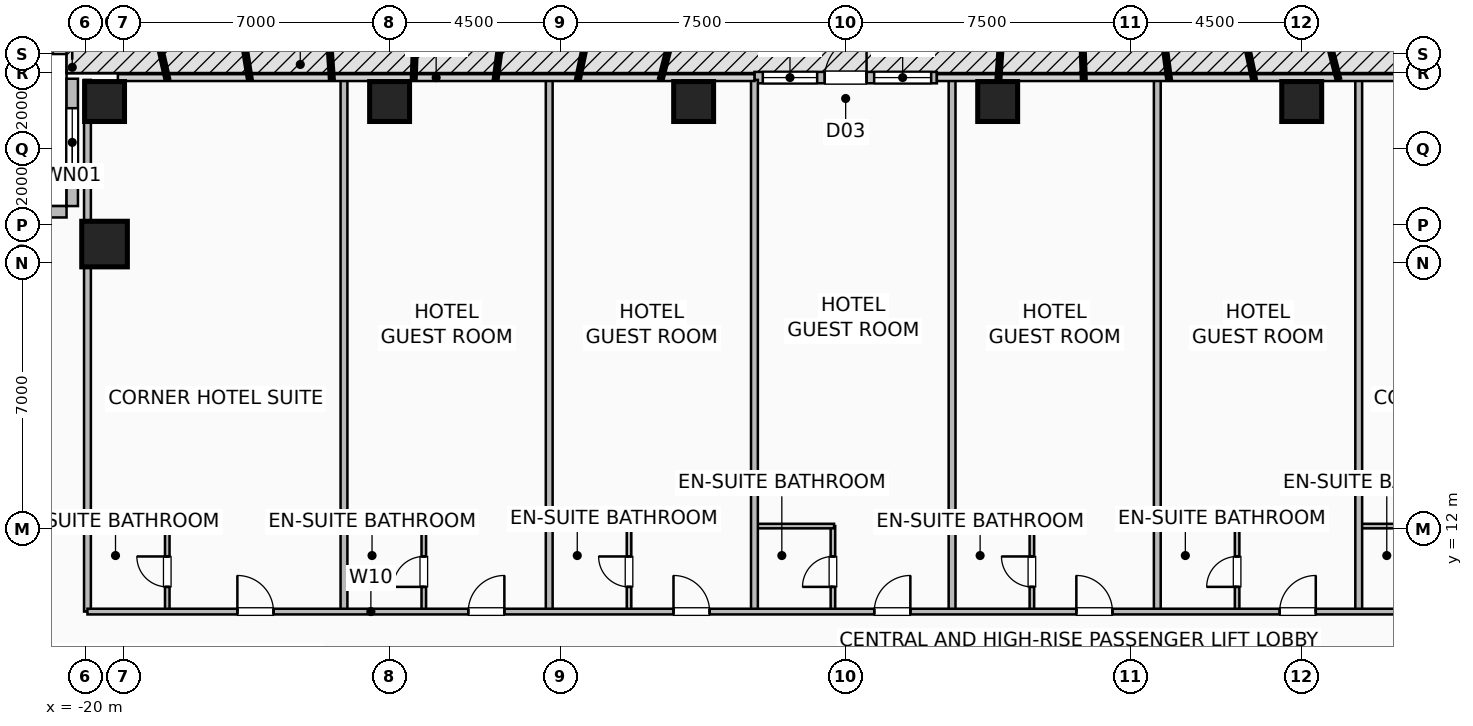
"""IFC4 building model, lengths in metres.
Left out: names, types, materials, properties, quantities, classifications, styles, units other than length and angle.
Written with IfcOpenShell. Run it as: python <this file> out.ifc"""

import sys

from ifc_helpers import new_model, si_unit, direction, frame, frame_2d, origin, origin_2d, place, context, subcontext, project, spatial, rectangle, hollow_rectangle, extrude, element, fill, save


model = new_model("IFC4")
c1 = context("Model", 3, precision=1e-05, world=origin(), true_north=direction((0.0, 1.0)))
c2 = subcontext(c1, "Body", "Model", "MODEL_VIEW")
j1 = project(units=[si_unit("LENGTHUNIT", "METRE"), si_unit("PLANEANGLEUNIT", "RADIAN")], contexts=[c1])
p1 = place(None, origin())
s1 = spatial("IfcSite", under=j1, at=p1, CompositionType="ELEMENT")
p2 = place(p1, origin())
s2 = spatial("IfcBuilding", under=s1, at=p2, CompositionType="ELEMENT")
p3 = place(p2, frame((0.0, 0.0, 27.0)))
s3 = spatial("IfcBuildingStorey", under=s2, at=p3, CompositionType="ELEMENT", Elevation=27.0)
p4 = place(p3, frame((-19.5, 23.25, 0.0), z_axis=(0.0, 0.0, 1.0), x_axis=(1.0, 0.0, 0.0)))
e1 = element("IfcColumn", 1, at=p4, inside=s3, PredefinedType="COLUMN", context=c2, shape_type="SweptSolid", body=[
    extrude(hollow_rectangle(XDim=1.05, YDim=1.05, WallThickness=0.05, at=origin_2d()), origin(), (0.0, 0.0, 1.0), 3.5),
])
p5 = place(p3, frame((-12.0, 23.25, -0.4), z_axis=(0.0, 0.0, 1.0), x_axis=(1.0, 0.0, 0.0)))
e2 = element("IfcColumn", 2, at=p5, inside=s3, PredefinedType="COLUMN", context=c2, shape_type="SweptSolid", body=[
    extrude(hollow_rectangle(XDim=1.05, YDim=1.05, WallThickness=0.05, at=origin_2d()), origin(), (0.0, 0.0, 1.0), 3.9),
])
for number, where, z_axis, x_axis in (
    (3, (-4.0, 23.25, 0.0), (0.0, 0.0, 1.0), (1.0, 0.0, 0.0)),
    (4, (4.0, 23.25, 0.0), (0.0, 0.0, 1.0), (1.0, 0.0, 0.0)),
):
    element("IfcColumn", number, at=place(p3, frame(where, z_axis=z_axis, x_axis=x_axis)), inside=s3, PredefinedType="COLUMN", context=c2, shape_type="SweptSolid", body=[
        extrude(hollow_rectangle(XDim=1.05, YDim=1.05, WallThickness=0.05, at=origin_2d()), origin(), (0.0, 0.0, 1.0), 3.5),
    ])
p6 = place(p3, frame((12.0, 23.25, -0.4), z_axis=(0.0, 0.0, 1.0), x_axis=(1.0, 0.0, 0.0)))
e5 = element("IfcColumn", 5, at=p6, inside=s3, PredefinedType="COLUMN", context=c2, shape_type="SweptSolid", body=[
    extrude(hollow_rectangle(XDim=1.05, YDim=1.05, WallThickness=0.05, at=origin_2d()), origin(), (0.0, 0.0, 1.0), 3.9),
])
p7 = place(p3, frame((-19.5, 19.5, 0.0), z_axis=(0.0, 0.0, 1.0), x_axis=(1.0, 0.0, 0.0)))
e6 = element("IfcColumn", 6, at=p7, inside=s3, PredefinedType="COLUMN", context=c2, shape_type="SweptSolid", body=[
    extrude(hollow_rectangle(XDim=1.2, YDim=1.2, WallThickness=0.055, at=origin_2d()), origin(), (0.0, 0.0, 1.0), 3.5),
])
p8 = place(p3, frame((-2.4, 23.88, 0.0), z_axis=(0.0, 0.0, 1.0), x_axis=(1.0, 0.0, 0.0)))
e7 = element("IfcWall", 7, at=p8, inside=s3, PredefinedType="SOLIDWALL", context=c2, shape_type="SweptSolid", body=[
    extrude(rectangle(XDim=4.8, YDim=0.3, at=frame_2d((2.4, 0.0))), origin(), (0.0, 0.0, 1.0), 3.25),
])
p9 = place(p8, frame((1.85, 0.0, 0.0)))
e8 = element("IfcOpeningElement", 8, at=p9, cuts=e7, PredefinedType="OPENING", context=c2, shape_type="SweptSolid", body=[
    extrude(rectangle(XDim=1.1, YDim=2.2, at=frame_2d((0.55, 1.1))), frame((0.0, 0.16, 0.0), z_axis=(0.0, -1.0, 0.0), x_axis=(1.0, 0.0, 0.0)), (0.0, 0.0, 1.0), 0.32),
])
p10 = place(p8, frame((0.22, 0.0, 0.85)))
e9 = element("IfcOpeningElement", 9, at=p10, cuts=e7, PredefinedType="OPENING", context=c2, shape_type="SweptSolid", body=[
    extrude(rectangle(XDim=1.43, YDim=1.8, at=frame_2d((0.715, 0.9))), frame((0.0, 0.16, 0.0), z_axis=(0.0, -1.0, 0.0), x_axis=(1.0, 0.0, 0.0)), (0.0, 0.0, 1.0), 0.32),
])
p11 = place(p8, frame((3.15, 0.0, 0.85)))
e10 = element("IfcOpeningElement", 10, at=p11, cuts=e7, PredefinedType="OPENING", context=c2, shape_type="SweptSolid", body=[
    extrude(rectangle(XDim=1.5, YDim=1.8, at=frame_2d((0.75, 0.9))), frame((0.0, 0.16, 0.0), z_axis=(0.0, -1.0, 0.0), x_axis=(1.0, 0.0, 0.0)), (0.0, 0.0, 1.0), 0.32),
])
p12 = place(p3, frame((-20.35, 23.85, 0.0), z_axis=(0.0, 0.0, 1.0), x_axis=(0.0, -1.0, 0.0)))
e11 = element("IfcWall", 11, at=p12, inside=s3, PredefinedType="SOLIDWALL", context=c2, shape_type="SweptSolid", body=[
    extrude(rectangle(XDim=3.35, YDim=0.3, at=frame_2d((1.675, 0.0))), origin(), (0.0, 0.0, 1.0), 3.25),
])
p13 = place(p12, frame((0.775, 0.0, 0.9)))
e12 = element("IfcOpeningElement", 12, at=p13, cuts=e11, PredefinedType="OPENING", context=c2, shape_type="SweptSolid", body=[
    extrude(rectangle(XDim=1.8, YDim=1.8, at=frame_2d((0.9, 0.9))), frame((0.0, 0.16, 0.0), z_axis=(0.0, -1.0, 0.0), x_axis=(1.0, 0.0, 0.0)), (0.0, 0.0, 1.0), 0.32),
])
p14 = place(p3, frame((-23.85, 20.35, 0.0), z_axis=(0.0, 0.0, 1.0), x_axis=(1.0, 0.0, 0.0)))
e13 = element("IfcWall", 13, at=p14, inside=s3, PredefinedType="SOLIDWALL", context=c2, shape_type="SweptSolid", body=[
    extrude(rectangle(XDim=3.35, YDim=0.3, at=frame_2d((1.675, 0.0))), origin(), (0.0, 0.0, 1.0), 3.25),
])
p15 = place(p3, frame((-17.85, 9.83, 0.0), z_axis=(0.0, 0.0, 1.0), x_axis=(0.0, 1.0, 0.0)))
e14 = element("IfcWall", 14, at=p15, inside=s3, PredefinedType="PLUMBINGWALL", context=c2, shape_type="SweptSolid", body=[
    extrude(rectangle(XDim=2.25, YDim=0.12, at=frame_2d((1.125, 0.0))), origin(), (0.0, 0.0, 1.0), 3.25),
])
p16 = place(p15, frame((0.65, 0.0, 0.0)))
e15 = element("IfcOpeningElement", 15, at=p16, cuts=e14, PredefinedType="OPENING", context=c2, shape_type="SweptSolid", body=[
    extrude(rectangle(XDim=0.8, YDim=2.05, at=frame_2d((0.4, 1.025))), frame((0.0, 0.07, 0.0), z_axis=(0.0, -1.0, 0.0), x_axis=(1.0, 0.0, 0.0)), (0.0, 0.0, 1.0), 0.14),
])
p17 = place(p3, frame((-19.92, 12.08, 0.0), z_axis=(0.0, 0.0, 1.0), x_axis=(1.0, 0.0, 0.0)))
e16 = element("IfcWall", 16, at=p17, inside=s3, PredefinedType="PLUMBINGWALL", context=c2, shape_type="SweptSolid", body=[
    extrude(rectangle(XDim=2.1, YDim=0.12, at=frame_2d((1.05, 0.0))), origin(), (0.0, 0.0, 1.0), 3.25),
])
p18 = place(p3, frame((-11.1, 9.83, 0.0), z_axis=(0.0, 0.0, 1.0), x_axis=(0.0, 1.0, 0.0)))
e17 = element("IfcWall", 17, at=p18, inside=s3, PredefinedType="PLUMBINGWALL", context=c2, shape_type="SweptSolid", body=[
    extrude(rectangle(XDim=2.25, YDim=0.12, at=frame_2d((1.125, 0.0))), origin(), (0.0, 0.0, 1.0), 3.25),
])
p19 = place(p18, frame((0.65, 0.0, 0.0)))
e18 = element("IfcOpeningElement", 18, at=p19, cuts=e17, PredefinedType="OPENING", context=c2, shape_type="SweptSolid", body=[
    extrude(rectangle(XDim=0.8, YDim=2.05, at=frame_2d((0.4, 1.025))), frame((0.0, 0.07, 0.0), z_axis=(0.0, -1.0, 0.0), x_axis=(1.0, 0.0, 0.0)), (0.0, 0.0, 1.0), 0.14),
])
p20 = place(p3, frame((-13.17, 12.08, 0.0), z_axis=(0.0, 0.0, 1.0), x_axis=(1.0, 0.0, 0.0)))
e19 = element("IfcWall", 19, at=p20, inside=s3, PredefinedType="PLUMBINGWALL", context=c2, shape_type="SweptSolid", body=[
    extrude(rectangle(XDim=2.1, YDim=0.12, at=frame_2d((1.05, 0.0))), origin(), (0.0, 0.0, 1.0), 3.25),
])
p21 = place(p3, frame((-5.7, 9.83, 0.0), z_axis=(0.0, 0.0, 1.0), x_axis=(0.0, 1.0, 0.0)))
e20 = element("IfcWall", 20, at=p21, inside=s3, PredefinedType="PLUMBINGWALL", context=c2, shape_type="SweptSolid", body=[
    extrude(rectangle(XDim=2.25, YDim=0.12, at=frame_2d((1.125, 0.0))), origin(), (0.0, 0.0, 1.0), 3.25),
])
p22 = place(p21, frame((0.65, 0.0, 0.0)))
e21 = element("IfcOpeningElement", 21, at=p22, cuts=e20, PredefinedType="OPENING", context=c2, shape_type="SweptSolid", body=[
    extrude(rectangle(XDim=0.8, YDim=2.05, at=frame_2d((0.4, 1.025))), frame((0.0, 0.07, 0.0), z_axis=(0.0, -1.0, 0.0), x_axis=(1.0, 0.0, 0.0)), (0.0, 0.0, 1.0), 0.14),
])
p23 = place(p3, frame((-7.77, 12.08, 0.0), z_axis=(0.0, 0.0, 1.0), x_axis=(1.0, 0.0, 0.0)))
e22 = element("IfcWall", 22, at=p23, inside=s3, PredefinedType="PLUMBINGWALL", context=c2, shape_type="SweptSolid", body=[
    extrude(rectangle(XDim=2.1, YDim=0.12, at=frame_2d((1.05, 0.0))), origin(), (0.0, 0.0, 1.0), 3.25),
])
p24 = place(p3, frame((-0.335, 9.83, 0.0), z_axis=(0.0, 0.0, 1.0), x_axis=(0.0, 1.0, 0.0)))
e23 = element("IfcWall", 23, at=p24, inside=s3, PredefinedType="PLUMBINGWALL", context=c2, shape_type="SweptSolid", body=[
    extrude(rectangle(XDim=2.25, YDim=0.12, at=frame_2d((1.125, 0.0))), origin(), (0.0, 0.0, 1.0), 3.25),
])
p25 = place(p24, frame((0.65, 0.0, 0.0)))
e24 = element("IfcOpeningElement", 24, at=p25, cuts=e23, PredefinedType="OPENING", context=c2, shape_type="SweptSolid", body=[
    extrude(rectangle(XDim=0.8, YDim=2.05, at=frame_2d((0.4, 1.025))), frame((0.0, 0.07, 0.0), z_axis=(0.0, -1.0, 0.0), x_axis=(1.0, 0.0, 0.0)), (0.0, 0.0, 1.0), 0.14),
])
p26 = place(p3, frame((-2.37, 12.08, 0.0), z_axis=(0.0, 0.0, 1.0), x_axis=(1.0, 0.0, 0.0)))
e25 = element("IfcWall", 25, at=p26, inside=s3, PredefinedType="PLUMBINGWALL", context=c2, shape_type="SweptSolid", body=[
    extrude(rectangle(XDim=2.065, YDim=0.12, at=frame_2d((1.033, 0.0))), origin(), (0.0, 0.0, 1.0), 3.25),
])
p27 = place(p3, frame((4.9, 9.83, 0.0), z_axis=(0.0, 0.0, 1.0), x_axis=(0.0, 1.0, 0.0)))
e26 = element("IfcWall", 26, at=p27, inside=s3, PredefinedType="PLUMBINGWALL", context=c2, shape_type="SweptSolid", body=[
    extrude(rectangle(XDim=2.25, YDim=0.12, at=frame_2d((1.125, 0.0))), origin(), (0.0, 0.0, 1.0), 2.818),
])
p28 = place(p27, frame((0.65, 0.0, 0.0)))
e27 = element("IfcOpeningElement", 27, at=p28, cuts=e26, PredefinedType="OPENING", context=c2, shape_type="SweptSolid", body=[
    extrude(rectangle(XDim=0.8, YDim=2.05, at=frame_2d((0.4, 1.025))), frame((0.0, 0.07, 0.0), z_axis=(0.0, -1.0, 0.0), x_axis=(1.0, 0.0, 0.0)), (0.0, 0.0, 1.0), 0.14),
])
p29 = place(p3, frame((2.83, 12.08, 0.0), z_axis=(0.0, 0.0, 1.0), x_axis=(1.0, 0.0, 0.0)))
e28 = element("IfcWall", 28, at=p29, inside=s3, PredefinedType="PLUMBINGWALL", context=c2, shape_type="SweptSolid", body=[
    extrude(rectangle(XDim=2.1, YDim=0.12, at=frame_2d((1.05, 0.0))), origin(), (0.0, 0.0, 1.0), 3.25),
])
p30 = place(p3, frame((10.3, 9.83, 0.0), z_axis=(0.0, 0.0, 1.0), x_axis=(0.0, 1.0, 0.0)))
e29 = element("IfcWall", 29, at=p30, inside=s3, PredefinedType="PLUMBINGWALL", context=c2, shape_type="SweptSolid", body=[
    extrude(rectangle(XDim=2.25, YDim=0.12, at=frame_2d((1.125, 0.0))), origin(), (0.0, 0.0, 1.0), 3.25),
])
p31 = place(p30, frame((0.65, 0.0, 0.0)))
e30 = element("IfcOpeningElement", 30, at=p31, cuts=e29, PredefinedType="OPENING", context=c2, shape_type="SweptSolid", body=[
    extrude(rectangle(XDim=0.8, YDim=2.05, at=frame_2d((0.4, 1.025))), frame((0.0, 0.07, 0.0), z_axis=(0.0, -1.0, 0.0), x_axis=(1.0, 0.0, 0.0)), (0.0, 0.0, 1.0), 0.14),
])
p32 = place(p3, frame((8.23, 12.08, 0.0), z_axis=(0.0, 0.0, 1.0), x_axis=(1.0, 0.0, 0.0)))
e31 = element("IfcWall", 31, at=p32, inside=s3, PredefinedType="PLUMBINGWALL", context=c2, shape_type="SweptSolid", body=[
    extrude(rectangle(XDim=2.1, YDim=0.12, at=frame_2d((1.05, 0.0))), origin(), (0.0, 0.0, 1.0), 3.25),
])
p33 = place(p3, frame((13.53, 12.08, 0.0), z_axis=(0.0, 0.0, 1.0), x_axis=(1.0, 0.0, 0.0)))
e32 = element("IfcWall", 32, at=p33, inside=s3, PredefinedType="PLUMBINGWALL", context=c2, shape_type="SweptSolid", body=[
    extrude(rectangle(XDim=2.1, YDim=0.12, at=frame_2d((1.05, 0.0))), origin(), (0.0, 0.0, 1.0), 3.25),
])
for number, where, z_axis, x_axis in (
    (33, (-19.95, 9.83, 0.0), (0.0, 0.0, 1.0), (0.0, 1.0, 0.0)),
    (34, (-13.2, 9.83, 0.0), (0.0, 0.0, 1.0), (0.0, 1.0, 0.0)),
    (35, (-7.8, 9.83, 0.0), (0.0, 0.0, 1.0), (0.0, 1.0, 0.0)),
    (36, (-2.4, 9.83, 0.0), (0.0, 0.0, 1.0), (0.0, 1.0, 0.0)),
    (37, (2.8, 9.83, 0.0), (0.0, 0.0, 1.0), (0.0, 1.0, 0.0)),
    (38, (8.2, 9.83, 0.0), (0.0, 0.0, 1.0), (0.0, 1.0, 0.0)),
    (39, (13.5, 9.83, 0.0), (0.0, 0.0, 1.0), (0.0, 1.0, 0.0)),
):
    element("IfcWall", number, at=place(p3, frame(where, z_axis=z_axis, x_axis=x_axis)), inside=s3, PredefinedType="PARTITIONING", context=c2, shape_type="SweptSolid", body=[
        extrude(rectangle(XDim=13.99, YDim=0.18, at=frame_2d((6.995, 0.0))), origin(), (0.0, 0.0, 1.0), 3.25),
    ])
p34 = place(p3, frame((-19.95, 9.83, 0.0), z_axis=(0.0, 0.0, 1.0), x_axis=(1.0, 0.0, 0.0)))
e40 = element("IfcWall", 40, at=p34, inside=s3, PredefinedType="PARTITIONING", context=c2, shape_type="SweptSolid", body=[
    extrude(rectangle(XDim=39.9, YDim=0.15, at=frame_2d((19.95, 0.0))), origin(), (0.0, 0.0, 1.0), 3.25),
])
p35 = place(p34, frame((3.945, 0.0, 0.0)))
e41 = element("IfcOpeningElement", 41, at=p35, cuts=e40, PredefinedType="OPENING", context=c2, shape_type="SweptSolid", body=[
    extrude(rectangle(XDim=0.95, YDim=2.08, at=frame_2d((0.475, 1.04))), frame((0.0, 0.085, 0.0), z_axis=(0.0, -1.0, 0.0), x_axis=(1.0, 0.0, 0.0)), (0.0, 0.0, 1.0), 0.17),
])
p36 = place(p34, frame((10.02, 0.0, 0.0)))
e42 = element("IfcOpeningElement", 42, at=p36, cuts=e40, PredefinedType="OPENING", context=c2, shape_type="SweptSolid", body=[
    extrude(rectangle(XDim=0.95, YDim=2.08, at=frame_2d((0.475, 1.04))), frame((0.0, 0.085, 0.0), z_axis=(0.0, -1.0, 0.0), x_axis=(1.0, 0.0, 0.0)), (0.0, 0.0, 1.0), 0.17),
])
p37 = place(p34, frame((15.42, 0.0, 0.0)))
e43 = element("IfcOpeningElement", 43, at=p37, cuts=e40, PredefinedType="OPENING", context=c2, shape_type="SweptSolid", body=[
    extrude(rectangle(XDim=0.95, YDim=2.08, at=frame_2d((0.475, 1.04))), frame((0.0, 0.085, 0.0), z_axis=(0.0, -1.0, 0.0), x_axis=(1.0, 0.0, 0.0)), (0.0, 0.0, 1.0), 0.17),
])
p38 = place(p34, frame((20.702, 0.0, 0.0)))
e44 = element("IfcOpeningElement", 44, at=p38, cuts=e40, PredefinedType="OPENING", context=c2, shape_type="SweptSolid", body=[
    extrude(rectangle(XDim=0.95, YDim=2.08, at=frame_2d((0.475, 1.04))), frame((0.0, 0.085, 0.0), z_axis=(0.0, -1.0, 0.0), x_axis=(1.0, 0.0, 0.0)), (0.0, 0.0, 1.0), 0.17),
])
p39 = place(p34, frame((26.02, 0.0, 0.0)))
e45 = element("IfcOpeningElement", 45, at=p39, cuts=e40, PredefinedType="OPENING", context=c2, shape_type="SweptSolid", body=[
    extrude(rectangle(XDim=0.95, YDim=2.08, at=frame_2d((0.475, 1.04))), frame((0.0, 0.085, 0.0), z_axis=(0.0, -1.0, 0.0), x_axis=(1.0, 0.0, 0.0)), (0.0, 0.0, 1.0), 0.17),
])
p40 = place(p34, frame((31.37, 0.0, 0.0)))
e46 = element("IfcOpeningElement", 46, at=p40, cuts=e40, PredefinedType="OPENING", context=c2, shape_type="SweptSolid", body=[
    extrude(rectangle(XDim=0.95, YDim=2.08, at=frame_2d((0.475, 1.04))), frame((0.0, 0.085, 0.0), z_axis=(0.0, -1.0, 0.0), x_axis=(1.0, 0.0, 0.0)), (0.0, 0.0, 1.0), 0.17),
])
p41 = place(p34, frame((37.245, 0.0, 0.0)))
e47 = element("IfcOpeningElement", 47, at=p41, cuts=e40, PredefinedType="OPENING", context=c2, shape_type="SweptSolid", body=[
    extrude(rectangle(XDim=0.95, YDim=2.08, at=frame_2d((0.475, 1.04))), frame((0.0, 0.085, 0.0), z_axis=(0.0, -1.0, 0.0), x_axis=(1.0, 0.0, 0.0)), (0.0, 0.0, 1.0), 0.17),
])
p42 = place(p9, origin())
e48 = element("IfcDoor", 48, at=p42, inside=s3, OperationType="SINGLE_SWING_RIGHT", PredefinedType="DOOR", context=c2, shape_type="SweptSolid", body=[
    extrude(rectangle(XDim=1.1, YDim=2.2, at=frame_2d((0.55, 1.1))), frame((0.0, 0.025, 0.0), z_axis=(0.0, -1.0, 0.0), x_axis=(1.0, 0.0, 0.0)), (0.0, 0.0, 1.0), 0.05),
])
fill(e8, e48)
p43 = place(p10, origin())
e49 = element("IfcWindow", 49, at=p43, inside=s3, PartitioningType="SINGLE_PANEL", PredefinedType="WINDOW", context=c2, shape_type="SweptSolid", body=[
    extrude(rectangle(XDim=1.43, YDim=1.8, at=frame_2d((0.715, 0.9))), frame((0.0, 0.03, 0.0), z_axis=(0.0, -1.0, 0.0), x_axis=(1.0, 0.0, 0.0)), (0.0, 0.0, 1.0), 0.06),
])
fill(e9, e49)
p44 = place(p11, origin())
e50 = element("IfcWindow", 50, at=p44, inside=s3, PartitioningType="SINGLE_PANEL", PredefinedType="WINDOW", context=c2, shape_type="SweptSolid", body=[
    extrude(rectangle(XDim=1.5, YDim=1.8, at=frame_2d((0.75, 0.9))), frame((0.0, 0.03, 0.0), z_axis=(0.0, -1.0, 0.0), x_axis=(1.0, 0.0, 0.0)), (0.0, 0.0, 1.0), 0.06),
])
fill(e10, e50)
p45 = place(p13, origin())
e51 = element("IfcWindow", 51, at=p45, inside=s3, PartitioningType="SINGLE_PANEL", PredefinedType="WINDOW", context=c2, shape_type="SweptSolid", body=[
    extrude(rectangle(XDim=1.8, YDim=1.8, at=frame_2d((0.9, 0.9))), frame((0.0, 0.03, 0.0), z_axis=(0.0, -1.0, 0.0), x_axis=(1.0, 0.0, 0.0)), (0.0, 0.0, 1.0), 0.06),
])
fill(e12, e51)
p46 = place(p16, origin())
e52 = element("IfcDoor", 52, at=p46, inside=s3, OperationType="SINGLE_SWING_RIGHT", PredefinedType="DOOR", context=c2, shape_type="SweptSolid", body=[
    extrude(rectangle(XDim=0.8, YDim=2.05, at=frame_2d((0.4, 1.025))), frame((0.0, 0.025, 0.0), z_axis=(0.0, -1.0, 0.0), x_axis=(1.0, 0.0, 0.0)), (0.0, 0.0, 1.0), 0.05),
])
fill(e15, e52)
p47 = place(p19, origin())
e53 = element("IfcDoor", 53, at=p47, inside=s3, OperationType="SINGLE_SWING_LEFT", PredefinedType="DOOR", context=c2, shape_type="SweptSolid", body=[
    extrude(rectangle(XDim=0.8, YDim=2.05, at=frame_2d((0.4, 1.025))), frame((0.0, 0.025, 0.0), z_axis=(0.0, -1.0, 0.0), x_axis=(1.0, 0.0, 0.0)), (0.0, 0.0, 1.0), 0.05),
])
fill(e18, e53)
p48 = place(p22, origin())
e54 = element("IfcDoor", 54, at=p48, inside=s3, OperationType="SINGLE_SWING_RIGHT", PredefinedType="DOOR", context=c2, shape_type="SweptSolid", body=[
    extrude(rectangle(XDim=0.8, YDim=2.05, at=frame_2d((0.4, 1.025))), frame((0.0, 0.025, 0.0), z_axis=(0.0, -1.0, 0.0), x_axis=(1.0, 0.0, 0.0)), (0.0, 0.0, 1.0), 0.05),
])
fill(e21, e54)
p49 = place(p25, origin())
e55 = element("IfcDoor", 55, at=p49, inside=s3, OperationType="SINGLE_SWING_LEFT", PredefinedType="DOOR", context=c2, shape_type="SweptSolid", body=[
    extrude(rectangle(XDim=0.8, YDim=2.05, at=frame_2d((0.4, 1.025))), frame((0.0, 0.025, 0.0), z_axis=(0.0, -1.0, 0.0), x_axis=(1.0, 0.0, 0.0)), (0.0, 0.0, 1.0), 0.05),
])
fill(e24, e55)
p50 = place(p28, origin())
e56 = element("IfcDoor", 56, at=p50, inside=s3, OperationType="SINGLE_SWING_RIGHT", PredefinedType="DOOR", context=c2, shape_type="SweptSolid", body=[
    extrude(rectangle(XDim=0.8, YDim=2.05, at=frame_2d((0.4, 1.025))), frame((0.0, 0.025, 0.0), z_axis=(0.0, -1.0, 0.0), x_axis=(1.0, 0.0, 0.0)), (0.0, 0.0, 1.0), 0.05),
])
fill(e27, e56)
p51 = place(p31, origin())
e57 = element("IfcDoor", 57, at=p51, inside=s3, OperationType="SINGLE_SWING_LEFT", PredefinedType="DOOR", context=c2, shape_type="SweptSolid", body=[
    extrude(rectangle(XDim=0.8, YDim=2.05, at=frame_2d((0.4, 1.025))), frame((0.0, 0.025, 0.0), z_axis=(0.0, -1.0, 0.0), x_axis=(1.0, 0.0, 0.0)), (0.0, 0.0, 1.0), 0.05),
])
fill(e30, e57)
p52 = place(p35, origin())
e58 = element("IfcDoor", 58, at=p52, inside=s3, OperationType="SINGLE_SWING_LEFT", PredefinedType="DOOR", context=c2, shape_type="SweptSolid", body=[
    extrude(rectangle(XDim=0.95, YDim=2.08, at=frame_2d((0.475, 1.04))), frame((0.0, 0.025, 0.0), z_axis=(0.0, -1.0, 0.0), x_axis=(1.0, 0.0, 0.0)), (0.0, 0.0, 1.0), 0.05),
])
fill(e41, e58)
p53 = place(p36, origin())
e59 = element("IfcDoor", 59, at=p53, inside=s3, OperationType="SINGLE_SWING_RIGHT", PredefinedType="DOOR", context=c2, shape_type="SweptSolid", body=[
    extrude(rectangle(XDim=0.95, YDim=2.08, at=frame_2d((0.475, 1.04))), frame((0.0, 0.025, 0.0), z_axis=(0.0, -1.0, 0.0), x_axis=(1.0, 0.0, 0.0)), (0.0, 0.0, 1.0), 0.05),
])
fill(e42, e59)
p54 = place(p37, origin())
e60 = element("IfcDoor", 60, at=p54, inside=s3, OperationType="SINGLE_SWING_LEFT", PredefinedType="DOOR", context=c2, shape_type="SweptSolid", body=[
    extrude(rectangle(XDim=0.95, YDim=2.08, at=frame_2d((0.475, 1.04))), frame((0.0, 0.025, 0.0), z_axis=(0.0, -1.0, 0.0), x_axis=(1.0, 0.0, 0.0)), (0.0, 0.0, 1.0), 0.05),
])
fill(e43, e60)
p55 = place(p38, origin())
e61 = element("IfcDoor", 61, at=p55, inside=s3, OperationType="SINGLE_SWING_RIGHT", PredefinedType="DOOR", context=c2, shape_type="SweptSolid", body=[
    extrude(rectangle(XDim=0.95, YDim=2.08, at=frame_2d((0.475, 1.04))), frame((0.0, 0.025, 0.0), z_axis=(0.0, -1.0, 0.0), x_axis=(1.0, 0.0, 0.0)), (0.0, 0.0, 1.0), 0.05),
])
fill(e44, e61)
p56 = place(p39, origin())
e62 = element("IfcDoor", 62, at=p56, inside=s3, OperationType="SINGLE_SWING_LEFT", PredefinedType="DOOR", context=c2, shape_type="SweptSolid", body=[
    extrude(rectangle(XDim=0.95, YDim=2.08, at=frame_2d((0.475, 1.04))), frame((0.0, 0.025, 0.0), z_axis=(0.0, -1.0, 0.0), x_axis=(1.0, 0.0, 0.0)), (0.0, 0.0, 1.0), 0.05),
])
fill(e45, e62)
p57 = place(p40, origin())
e63 = element("IfcDoor", 63, at=p57, inside=s3, OperationType="SINGLE_SWING_RIGHT", PredefinedType="DOOR", context=c2, shape_type="SweptSolid", body=[
    extrude(rectangle(XDim=0.95, YDim=2.08, at=frame_2d((0.475, 1.04))), frame((0.0, 0.025, 0.0), z_axis=(0.0, -1.0, 0.0), x_axis=(1.0, 0.0, 0.0)), (0.0, 0.0, 1.0), 0.05),
])
fill(e46, e63)
save(model, sys.argv[1])
